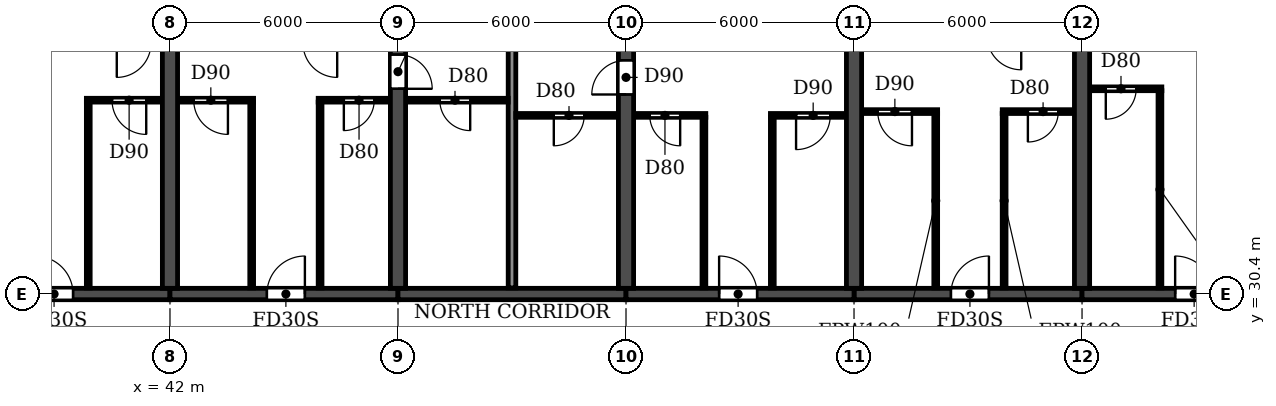
"""IFC4 building model, lengths in metres.
Left out: names, types, materials, properties, quantities, classifications, styles, units other than length and angle.
Written with IfcOpenShell. Run it as: python <this file> out.ifc"""

import sys

from ifc_helpers import new_model, si_unit, direction, frame, frame_2d, origin, place, context, subcontext, project, spatial, rectangle, extrude, element, fill, save


model = new_model("IFC4")
c1 = context("Model", 3, precision=1e-05, world=origin(), true_north=direction((0.0, 1.0)))
c2 = subcontext(c1, "Body", "Model", "MODEL_VIEW")
j1 = project(units=[si_unit("LENGTHUNIT", "METRE"), si_unit("PLANEANGLEUNIT", "RADIAN")], contexts=[c1])
p1 = place(None, origin())
s1 = spatial("IfcSite", under=j1, at=p1, CompositionType="ELEMENT")
p2 = place(p1, origin())
s2 = spatial("IfcBuilding", under=s1, at=p2, CompositionType="ELEMENT")
p3 = place(p2, frame((0.0, 0.0, 63.0)))
s3 = spatial("IfcBuildingStorey", under=s2, at=p3, CompositionType="ELEMENT", Elevation=63.0)
p4 = place(p3, frame((42.0, 30.55, 0.0), z_axis=(0.0, 0.0, 1.0), x_axis=(0.0, 1.0, 0.0)))
e1 = element("IfcWall", 1, at=p4, inside=s3, PredefinedType="SHEAR", context=c2, shape_type="SweptSolid", body=[
    extrude(rectangle(XDim=14.05, YDim=0.4, at=frame_2d((7.025, 0.0))), origin(), (0.0, 0.0, 1.0), 2.95),
])
p5 = place(p3, frame((48.0, 30.55, 0.0), z_axis=(0.0, 0.0, 1.0), x_axis=(0.0, 1.0, 0.0)))
e2 = element("IfcWall", 2, at=p5, inside=s3, PredefinedType="SHEAR", context=c2, shape_type="SweptSolid", body=[
    extrude(rectangle(XDim=14.05, YDim=0.4, at=frame_2d((7.025, 0.0))), origin(), (0.0, 0.0, 1.0), 2.95),
])
p6 = place(p5, frame((5.25, 0.0, 0.0)))
e3 = element("IfcOpeningElement", 3, at=p6, cuts=e2, PredefinedType="OPENING", context=c2, shape_type="SweptSolid", body=[
    extrude(rectangle(XDim=0.9, YDim=2.1, at=frame_2d((0.45, 1.05))), frame((0.0, 0.21, 0.0), z_axis=(0.0, -1.0, 0.0), x_axis=(1.0, 0.0, 0.0)), (0.0, 0.0, 1.0), 0.42),
])
p7 = place(p3, frame((54.0, 30.55, 0.0), z_axis=(0.0, 0.0, 1.0), x_axis=(0.0, 1.0, 0.0)))
e4 = element("IfcWall", 4, at=p7, inside=s3, PredefinedType="SHEAR", context=c2, shape_type="SweptSolid", body=[
    extrude(rectangle(XDim=14.05, YDim=0.4, at=frame_2d((7.025, 0.0))), origin(), (0.0, 0.0, 1.0), 2.95),
])
p8 = place(p7, frame((5.1, 0.0, 0.0)))
e5 = element("IfcOpeningElement", 5, at=p8, cuts=e4, PredefinedType="OPENING", context=c2, shape_type="SweptSolid", body=[
    extrude(rectangle(XDim=0.9, YDim=2.1, at=frame_2d((0.45, 1.05))), frame((0.0, 0.21, 0.0), z_axis=(0.0, -1.0, 0.0), x_axis=(1.0, 0.0, 0.0)), (0.0, 0.0, 1.0), 0.42),
])
for number, where, z_axis, x_axis in (
    (6, (60.0, 30.55, 0.0), (0.0, 0.0, 1.0), (0.0, 1.0, 0.0)),
    (7, (66.0, 30.55, 0.0), (0.0, 0.0, 1.0), (0.0, 1.0, 0.0)),
):
    element("IfcWall", number, at=place(p3, frame(where, z_axis=z_axis, x_axis=x_axis)), inside=s3, PredefinedType="SHEAR", context=c2, shape_type="SweptSolid", body=[
        extrude(rectangle(XDim=14.05, YDim=0.4, at=frame_2d((7.025, 0.0))), origin(), (0.0, 0.0, 1.0), 2.95),
    ])
p9 = place(p3, frame((36.0, 30.4, 0.0), z_axis=(0.0, 0.0, 1.0), x_axis=(1.0, 0.0, 0.0)))
e8 = element("IfcWall", 8, at=p9, inside=s3, PredefinedType="SHEAR", context=c2, shape_type="SweptSolid", body=[
    extrude(rectangle(XDim=6.0, YDim=0.3, at=frame_2d((3.0, 0.0))), origin(), (0.0, 0.0, 1.0), 2.35),
])
p10 = place(p9, frame((2.45, 0.0, 0.0)))
e9 = element("IfcOpeningElement", 9, at=p10, cuts=e8, PredefinedType="OPENING", context=c2, shape_type="SweptSolid", body=[
    extrude(rectangle(XDim=1.0, YDim=2.1, at=frame_2d((0.5, 1.05))), frame((0.0, 0.16, 0.0), z_axis=(0.0, -1.0, 0.0), x_axis=(1.0, 0.0, 0.0)), (0.0, 0.0, 1.0), 0.32),
])
p11 = place(p3, frame((42.0, 30.4, 0.0), z_axis=(0.0, 0.0, 1.0), x_axis=(1.0, 0.0, 0.0)))
e10 = element("IfcWall", 10, at=p11, inside=s3, PredefinedType="SHEAR", context=c2, shape_type="SweptSolid", body=[
    extrude(rectangle(XDim=6.0, YDim=0.3, at=frame_2d((3.0, 0.0))), origin(), (0.0, 0.0, 1.0), 2.35),
])
p12 = place(p11, frame((2.55, 0.0, 0.0)))
e11 = element("IfcOpeningElement", 11, at=p12, cuts=e10, PredefinedType="OPENING", context=c2, shape_type="SweptSolid", body=[
    extrude(rectangle(XDim=1.0, YDim=2.1, at=frame_2d((0.5, 1.05))), frame((0.0, 0.16, 0.0), z_axis=(0.0, -1.0, 0.0), x_axis=(1.0, 0.0, 0.0)), (0.0, 0.0, 1.0), 0.32),
])
p13 = place(p3, frame((48.0, 30.4, 0.0), z_axis=(0.0, 0.0, 1.0), x_axis=(1.0, 0.0, 0.0)))
e12 = element("IfcWall", 12, at=p13, inside=s3, PredefinedType="SHEAR", context=c2, shape_type="SweptSolid", body=[
    extrude(rectangle(XDim=6.0, YDim=0.3, at=frame_2d((3.0, 0.0))), origin(), (0.0, 0.0, 1.0), 2.35),
])
p14 = place(p3, frame((54.0, 30.4, 0.0), z_axis=(0.0, 0.0, 1.0), x_axis=(1.0, 0.0, 0.0)))
e13 = element("IfcWall", 13, at=p14, inside=s3, PredefinedType="SHEAR", context=c2, shape_type="SweptSolid", body=[
    extrude(rectangle(XDim=6.0, YDim=0.3, at=frame_2d((3.0, 0.0))), origin(), (0.0, 0.0, 1.0), 2.35),
])
p15 = place(p14, frame((2.45, 0.0, 0.0)))
e14 = element("IfcOpeningElement", 14, at=p15, cuts=e13, PredefinedType="OPENING", context=c2, shape_type="SweptSolid", body=[
    extrude(rectangle(XDim=1.0, YDim=2.1, at=frame_2d((0.5, 1.05))), frame((0.0, 0.16, 0.0), z_axis=(0.0, -1.0, 0.0), x_axis=(1.0, 0.0, 0.0)), (0.0, 0.0, 1.0), 0.32),
])
p16 = place(p3, frame((60.0, 30.4, 0.0), z_axis=(0.0, 0.0, 1.0), x_axis=(1.0, 0.0, 0.0)))
e15 = element("IfcWall", 15, at=p16, inside=s3, PredefinedType="SHEAR", context=c2, shape_type="SweptSolid", body=[
    extrude(rectangle(XDim=6.0, YDim=0.3, at=frame_2d((3.0, 0.0))), origin(), (0.0, 0.0, 1.0), 2.35),
])
p17 = place(p16, frame((2.55, 0.0, 0.0)))
e16 = element("IfcOpeningElement", 16, at=p17, cuts=e15, PredefinedType="OPENING", context=c2, shape_type="SweptSolid", body=[
    extrude(rectangle(XDim=1.0, YDim=2.1, at=frame_2d((0.5, 1.05))), frame((0.0, 0.16, 0.0), z_axis=(0.0, -1.0, 0.0), x_axis=(1.0, 0.0, 0.0)), (0.0, 0.0, 1.0), 0.32),
])
p18 = place(p3, frame((66.0, 30.4, 0.0), z_axis=(0.0, 0.0, 1.0), x_axis=(1.0, 0.0, 0.0)))
e17 = element("IfcWall", 17, at=p18, inside=s3, PredefinedType="SHEAR", context=c2, shape_type="SweptSolid", body=[
    extrude(rectangle(XDim=6.0, YDim=0.3, at=frame_2d((3.0, 0.0))), origin(), (0.0, 0.0, 1.0), 2.35),
])
p19 = place(p18, frame((2.45, 0.0, 0.0)))
e18 = element("IfcOpeningElement", 18, at=p19, cuts=e17, PredefinedType="OPENING", context=c2, shape_type="SweptSolid", body=[
    extrude(rectangle(XDim=1.0, YDim=2.1, at=frame_2d((0.5, 1.05))), frame((0.0, 0.16, 0.0), z_axis=(0.0, -1.0, 0.0), x_axis=(1.0, 0.0, 0.0)), (0.0, 0.0, 1.0), 0.32),
])
p20 = place(p3, frame((51.0, 30.56, 0.0), z_axis=(0.0, 0.0, 1.0), x_axis=(0.0, 1.0, 0.0)))
e19 = element("IfcWall", 19, at=p20, inside=s3, PredefinedType="PARTITIONING", context=c2, shape_type="SweptSolid", body=[
    extrude(rectangle(XDim=14.18, YDim=0.2, at=frame_2d((7.09, 0.0))), origin(), (0.0, 0.0, 1.0), 2.95),
])
p21 = place(p3, frame((51.1, 35.1, 0.0), z_axis=(0.0, 0.0, 1.0), x_axis=(1.0, 0.0, 0.0)))
e20 = element("IfcWall", 20, at=p21, inside=s3, PredefinedType="PARTITIONING", context=c2, shape_type="SweptSolid", body=[
    extrude(rectangle(XDim=2.69, YDim=0.1, at=frame_2d((1.345, 0.0))), origin(), (0.0, 0.0, 1.0), 2.95),
])
p22 = place(p21, frame((1.0, 0.0, 0.0)))
e21 = element("IfcOpeningElement", 21, at=p22, cuts=e20, PredefinedType="OPENING", context=c2, shape_type="SweptSolid", body=[
    extrude(rectangle(XDim=0.8, YDim=2.1, at=frame_2d((0.4, 1.05))), frame((0.0, 0.06, 0.0), z_axis=(0.0, -1.0, 0.0), x_axis=(1.0, 0.0, 0.0)), (0.0, 0.0, 1.0), 0.12),
])
p23 = place(p3, frame((54.21, 35.1, 0.0), z_axis=(0.0, 0.0, 1.0), x_axis=(1.0, 0.0, 0.0)))
e22 = element("IfcWall", 22, at=p23, inside=s3, PredefinedType="PARTITIONING", context=c2, shape_type="SweptSolid", body=[
    extrude(rectangle(XDim=1.89, YDim=0.1, at=frame_2d((0.945, 0.0))), origin(), (0.0, 0.0, 1.0), 2.95),
])
p24 = place(p23, frame((0.415, 0.0, 0.0)))
e23 = element("IfcOpeningElement", 23, at=p24, cuts=e22, PredefinedType="OPENING", context=c2, shape_type="SweptSolid", body=[
    extrude(rectangle(XDim=0.8, YDim=2.1, at=frame_2d((0.4, 1.05))), frame((0.0, 0.06, 0.0), z_axis=(0.0, -1.0, 0.0), x_axis=(1.0, 0.0, 0.0)), (0.0, 0.0, 1.0), 0.12),
])
p25 = place(p3, frame((57.8, 35.1, 0.0), z_axis=(0.0, 0.0, 1.0), x_axis=(1.0, 0.0, 0.0)))
e24 = element("IfcWall", 24, at=p25, inside=s3, PredefinedType="PARTITIONING", context=c2, shape_type="SweptSolid", body=[
    extrude(rectangle(XDim=1.99, YDim=0.1, at=frame_2d((0.995, 0.0))), origin(), (0.0, 0.0, 1.0), 2.95),
])
p26 = place(p25, frame((0.675, 0.0, 0.0)))
e25 = element("IfcOpeningElement", 25, at=p26, cuts=e24, PredefinedType="OPENING", context=c2, shape_type="SweptSolid", body=[
    extrude(rectangle(XDim=0.9, YDim=2.1, at=frame_2d((0.45, 1.05))), frame((0.0, 0.06, 0.0), z_axis=(0.0, -1.0, 0.0), x_axis=(1.0, 0.0, 0.0)), (0.0, 0.0, 1.0), 0.12),
])
p27 = place(p3, frame((60.21, 35.2, 0.0), z_axis=(0.0, 0.0, 1.0), x_axis=(1.0, 0.0, 0.0)))
e26 = element("IfcWall", 26, at=p27, inside=s3, PredefinedType="PARTITIONING", context=c2, shape_type="SweptSolid", body=[
    extrude(rectangle(XDim=1.99, YDim=0.1, at=frame_2d((0.995, 0.0))), origin(), (0.0, 0.0, 1.0), 2.95),
])
p28 = place(p27, frame((0.415, 0.0, 0.0)))
e27 = element("IfcOpeningElement", 27, at=p28, cuts=e26, PredefinedType="OPENING", context=c2, shape_type="SweptSolid", body=[
    extrude(rectangle(XDim=0.9, YDim=2.1, at=frame_2d((0.45, 1.05))), frame((0.0, 0.06, 0.0), z_axis=(0.0, -1.0, 0.0), x_axis=(1.0, 0.0, 0.0)), (0.0, 0.0, 1.0), 0.12),
])
p29 = place(p3, frame((63.9, 35.2, 0.0), z_axis=(0.0, 0.0, 1.0), x_axis=(1.0, 0.0, 0.0)))
e28 = element("IfcWall", 28, at=p29, inside=s3, PredefinedType="PARTITIONING", context=c2, shape_type="SweptSolid", body=[
    extrude(rectangle(XDim=1.89, YDim=0.1, at=frame_2d((0.945, 0.0))), origin(), (0.0, 0.0, 1.0), 2.95),
])
p30 = place(p29, frame((0.675, 0.0, 0.0)))
e29 = element("IfcOpeningElement", 29, at=p30, cuts=e28, PredefinedType="OPENING", context=c2, shape_type="SweptSolid", body=[
    extrude(rectangle(XDim=0.8, YDim=2.1, at=frame_2d((0.4, 1.05))), frame((0.0, 0.06, 0.0), z_axis=(0.0, -1.0, 0.0), x_axis=(1.0, 0.0, 0.0)), (0.0, 0.0, 1.0), 0.12),
])
p31 = place(p3, frame((39.8, 35.5, 0.0), z_axis=(0.0, 0.0, 1.0), x_axis=(1.0, 0.0, 0.0)))
e30 = element("IfcWall", 30, at=p31, inside=s3, PredefinedType="PARTITIONING", context=c2, shape_type="SweptSolid", body=[
    extrude(rectangle(XDim=1.99, YDim=0.1, at=frame_2d((0.995, 0.0))), origin(), (0.0, 0.0, 1.0), 2.95),
])
p32 = place(p31, frame((0.675, 0.0, 0.0)))
e31 = element("IfcOpeningElement", 31, at=p32, cuts=e30, PredefinedType="OPENING", context=c2, shape_type="SweptSolid", body=[
    extrude(rectangle(XDim=0.9, YDim=2.1, at=frame_2d((0.45, 1.05))), frame((0.0, 0.06, 0.0), z_axis=(0.0, -1.0, 0.0), x_axis=(1.0, 0.0, 0.0)), (0.0, 0.0, 1.0), 0.12),
])
p33 = place(p3, frame((42.21, 35.5, 0.0), z_axis=(0.0, 0.0, 1.0), x_axis=(1.0, 0.0, 0.0)))
e32 = element("IfcWall", 32, at=p33, inside=s3, PredefinedType="PARTITIONING", context=c2, shape_type="SweptSolid", body=[
    extrude(rectangle(XDim=1.99, YDim=0.1, at=frame_2d((0.995, 0.0))), origin(), (0.0, 0.0, 1.0), 2.95),
])
p34 = place(p33, frame((0.415, 0.0, 0.0)))
e33 = element("IfcOpeningElement", 33, at=p34, cuts=e32, PredefinedType="OPENING", context=c2, shape_type="SweptSolid", body=[
    extrude(rectangle(XDim=0.9, YDim=2.1, at=frame_2d((0.45, 1.05))), frame((0.0, 0.06, 0.0), z_axis=(0.0, -1.0, 0.0), x_axis=(1.0, 0.0, 0.0)), (0.0, 0.0, 1.0), 0.12),
])
p35 = place(p3, frame((45.9, 35.5, 0.0), z_axis=(0.0, 0.0, 1.0), x_axis=(1.0, 0.0, 0.0)))
e34 = element("IfcWall", 34, at=p35, inside=s3, PredefinedType="PARTITIONING", context=c2, shape_type="SweptSolid", body=[
    extrude(rectangle(XDim=1.89, YDim=0.1, at=frame_2d((0.945, 0.0))), origin(), (0.0, 0.0, 1.0), 2.95),
])
p36 = place(p35, frame((0.675, 0.0, 0.0)))
e35 = element("IfcOpeningElement", 35, at=p36, cuts=e34, PredefinedType="OPENING", context=c2, shape_type="SweptSolid", body=[
    extrude(rectangle(XDim=0.8, YDim=2.1, at=frame_2d((0.4, 1.05))), frame((0.0, 0.06, 0.0), z_axis=(0.0, -1.0, 0.0), x_axis=(1.0, 0.0, 0.0)), (0.0, 0.0, 1.0), 0.12),
])
p37 = place(p3, frame((48.21, 35.5, 0.0), z_axis=(0.0, 0.0, 1.0), x_axis=(1.0, 0.0, 0.0)))
e36 = element("IfcWall", 36, at=p37, inside=s3, PredefinedType="PARTITIONING", context=c2, shape_type="SweptSolid", body=[
    extrude(rectangle(XDim=2.69, YDim=0.1, at=frame_2d((1.345, 0.0))), origin(), (0.0, 0.0, 1.0), 2.95),
])
p38 = place(p37, frame((0.89, 0.0, 0.0)))
e37 = element("IfcOpeningElement", 37, at=p38, cuts=e36, PredefinedType="OPENING", context=c2, shape_type="SweptSolid", body=[
    extrude(rectangle(XDim=0.8, YDim=2.1, at=frame_2d((0.4, 1.05))), frame((0.0, 0.06, 0.0), z_axis=(0.0, -1.0, 0.0), x_axis=(1.0, 0.0, 0.0)), (0.0, 0.0, 1.0), 0.12),
])
p39 = place(p3, frame((66.21, 35.8, 0.0), z_axis=(0.0, 0.0, 1.0), x_axis=(1.0, 0.0, 0.0)))
e38 = element("IfcWall", 38, at=p39, inside=s3, PredefinedType="PARTITIONING", context=c2, shape_type="SweptSolid", body=[
    extrude(rectangle(XDim=1.89, YDim=0.1, at=frame_2d((0.945, 0.0))), origin(), (0.0, 0.0, 1.0), 2.95),
])
p40 = place(p39, frame((0.415, 0.0, 0.0)))
e39 = element("IfcOpeningElement", 39, at=p40, cuts=e38, PredefinedType="OPENING", context=c2, shape_type="SweptSolid", body=[
    extrude(rectangle(XDim=0.8, YDim=2.1, at=frame_2d((0.4, 1.05))), frame((0.0, 0.06, 0.0), z_axis=(0.0, -1.0, 0.0), x_axis=(1.0, 0.0, 0.0)), (0.0, 0.0, 1.0), 0.12),
])
for number, where, z_axis, x_axis in (
    (40, (39.85, 30.56, 0.0), (0.0, 0.0, 1.0), (0.0, 1.0, 0.0)),
    (41, (44.15, 30.56, 0.0), (0.0, 0.0, 1.0), (0.0, 1.0, 0.0)),
    (42, (45.95, 30.56, 0.0), (0.0, 0.0, 1.0), (0.0, 1.0, 0.0)),
):
    element("IfcWall", number, at=place(p3, frame(where, z_axis=z_axis, x_axis=x_axis)), inside=s3, PredefinedType="PARTITIONING", context=c2, shape_type="SweptSolid", body=[
        extrude(rectangle(XDim=4.89, YDim=0.1, at=frame_2d((2.445, 0.0))), origin(), (0.0, 0.0, 1.0), 2.95),
    ])
for number, where, z_axis, x_axis in (
    (43, (56.05, 30.56, 0.0), (0.0, 0.0, 1.0), (0.0, 1.0, 0.0)),
    (44, (57.85, 30.56, 0.0), (0.0, 0.0, 1.0), (0.0, 1.0, 0.0)),
):
    element("IfcWall", number, at=place(p3, frame(where, z_axis=z_axis, x_axis=x_axis)), inside=s3, PredefinedType="PARTITIONING", context=c2, shape_type="SweptSolid", body=[
        extrude(rectangle(XDim=4.49, YDim=0.1, at=frame_2d((2.245, 0.0))), origin(), (0.0, 0.0, 1.0), 2.95),
    ])
for number, where, z_axis, x_axis in (
    (45, (62.15, 30.56, 0.0), (0.0, 0.0, 1.0), (0.0, 1.0, 0.0)),
    (46, (63.95, 30.56, 0.0), (0.0, 0.0, 1.0), (0.0, 1.0, 0.0)),
):
    element("IfcWall", number, at=place(p3, frame(where, z_axis=z_axis, x_axis=x_axis)), inside=s3, PredefinedType="PARTITIONING", context=c2, shape_type="SweptSolid", body=[
        extrude(rectangle(XDim=4.59, YDim=0.1, at=frame_2d((2.295, 0.0))), origin(), (0.0, 0.0, 1.0), 2.95),
    ])
p41 = place(p3, frame((68.05, 30.56, 0.0), z_axis=(0.0, 0.0, 1.0), x_axis=(0.0, 1.0, 0.0)))
e47 = element("IfcWall", 47, at=p41, inside=s3, PredefinedType="PARTITIONING", context=c2, shape_type="SweptSolid", body=[
    extrude(rectangle(XDim=5.19, YDim=0.1, at=frame_2d((2.595, 0.0))), origin(), (0.0, 0.0, 1.0), 2.95),
])
p42 = place(p10, origin())
e48 = element("IfcDoor", 48, at=p42, inside=s3, OperationType="SINGLE_SWING_LEFT", PredefinedType="DOOR", context=c2, shape_type="SweptSolid", body=[
    extrude(rectangle(XDim=1.0, YDim=2.1, at=frame_2d((0.5, 1.05))), frame((0.0, 0.025, 0.0), z_axis=(0.0, -1.0, 0.0), x_axis=(1.0, 0.0, 0.0)), (0.0, 0.0, 1.0), 0.05),
])
fill(e9, e48)
p43 = place(p32, frame((0.9, 0.0, 0.0), z_axis=(0.0, 0.0, 1.0), x_axis=(-1.0, 0.0, 0.0)))
e49 = element("IfcDoor", 49, at=p43, inside=s3, OperationType="SINGLE_SWING_LEFT", PredefinedType="DOOR", context=c2, shape_type="SweptSolid", body=[
    extrude(rectangle(XDim=0.9, YDim=2.1, at=frame_2d((0.45, 1.05))), frame((0.0, 0.025, 0.0), z_axis=(0.0, -1.0, 0.0), x_axis=(1.0, 0.0, 0.0)), (0.0, 0.0, 1.0), 0.05),
])
fill(e31, e49)
p44 = place(p38, frame((0.8, 0.0, 0.0), z_axis=(0.0, 0.0, 1.0), x_axis=(-1.0, 0.0, 0.0)))
e50 = element("IfcDoor", 50, at=p44, inside=s3, OperationType="SINGLE_SWING_LEFT", PredefinedType="DOOR", context=c2, shape_type="SweptSolid", body=[
    extrude(rectangle(XDim=0.8, YDim=2.1, at=frame_2d((0.4, 1.05))), frame((0.0, 0.025, 0.0), z_axis=(0.0, -1.0, 0.0), x_axis=(1.0, 0.0, 0.0)), (0.0, 0.0, 1.0), 0.05),
])
fill(e37, e50)
p45 = place(p34, frame((0.9, 0.0, 0.0), z_axis=(0.0, 0.0, 1.0), x_axis=(-1.0, 0.0, 0.0)))
e51 = element("IfcDoor", 51, at=p45, inside=s3, OperationType="SINGLE_SWING_LEFT", PredefinedType="DOOR", context=c2, shape_type="SweptSolid", body=[
    extrude(rectangle(XDim=0.9, YDim=2.1, at=frame_2d((0.45, 1.05))), frame((0.0, 0.025, 0.0), z_axis=(0.0, -1.0, 0.0), x_axis=(1.0, 0.0, 0.0)), (0.0, 0.0, 1.0), 0.05),
])
fill(e33, e51)
p46 = place(p12, origin())
e52 = element("IfcDoor", 52, at=p46, inside=s3, OperationType="SINGLE_SWING_RIGHT", PredefinedType="DOOR", context=c2, shape_type="SweptSolid", body=[
    extrude(rectangle(XDim=1.0, YDim=2.1, at=frame_2d((0.5, 1.05))), frame((0.0, 0.025, 0.0), z_axis=(0.0, -1.0, 0.0), x_axis=(1.0, 0.0, 0.0)), (0.0, 0.0, 1.0), 0.05),
])
fill(e11, e52)
p47 = place(p36, frame((0.8, 0.0, 0.0), z_axis=(0.0, 0.0, 1.0), x_axis=(-1.0, 0.0, 0.0)))
e53 = element("IfcDoor", 53, at=p47, inside=s3, OperationType="SINGLE_SWING_RIGHT", PredefinedType="DOOR", context=c2, shape_type="SweptSolid", body=[
    extrude(rectangle(XDim=0.8, YDim=2.1, at=frame_2d((0.4, 1.05))), frame((0.0, 0.025, 0.0), z_axis=(0.0, -1.0, 0.0), x_axis=(1.0, 0.0, 0.0)), (0.0, 0.0, 1.0), 0.05),
])
fill(e35, e53)
p48 = place(p6, frame((0.9, 0.0, 0.0), z_axis=(0.0, 0.0, 1.0), x_axis=(-1.0, 0.0, 0.0)))
e54 = element("IfcDoor", 54, at=p48, inside=s3, OperationType="SINGLE_SWING_RIGHT", PredefinedType="DOOR", context=c2, shape_type="SweptSolid", body=[
    extrude(rectangle(XDim=0.9, YDim=2.1, at=frame_2d((0.45, 1.05))), frame((0.0, 0.025, 0.0), z_axis=(0.0, -1.0, 0.0), x_axis=(1.0, 0.0, 0.0)), (0.0, 0.0, 1.0), 0.05),
])
fill(e3, e54)
p49 = place(p22, frame((0.8, 0.0, 0.0), z_axis=(0.0, 0.0, 1.0), x_axis=(-1.0, 0.0, 0.0)))
e55 = element("IfcDoor", 55, at=p49, inside=s3, OperationType="SINGLE_SWING_RIGHT", PredefinedType="DOOR", context=c2, shape_type="SweptSolid", body=[
    extrude(rectangle(XDim=0.8, YDim=2.1, at=frame_2d((0.4, 1.05))), frame((0.0, 0.025, 0.0), z_axis=(0.0, -1.0, 0.0), x_axis=(1.0, 0.0, 0.0)), (0.0, 0.0, 1.0), 0.05),
])
fill(e21, e55)
p50 = place(p8, origin())
e56 = element("IfcDoor", 56, at=p50, inside=s3, OperationType="SINGLE_SWING_LEFT", PredefinedType="DOOR", context=c2, shape_type="SweptSolid", body=[
    extrude(rectangle(XDim=0.9, YDim=2.1, at=frame_2d((0.45, 1.05))), frame((0.0, 0.025, 0.0), z_axis=(0.0, -1.0, 0.0), x_axis=(1.0, 0.0, 0.0)), (0.0, 0.0, 1.0), 0.05),
])
fill(e5, e56)
p51 = place(p24, frame((0.8, 0.0, 0.0), z_axis=(0.0, 0.0, 1.0), x_axis=(-1.0, 0.0, 0.0)))
e57 = element("IfcDoor", 57, at=p51, inside=s3, OperationType="SINGLE_SWING_LEFT", PredefinedType="DOOR", context=c2, shape_type="SweptSolid", body=[
    extrude(rectangle(XDim=0.8, YDim=2.1, at=frame_2d((0.4, 1.05))), frame((0.0, 0.025, 0.0), z_axis=(0.0, -1.0, 0.0), x_axis=(1.0, 0.0, 0.0)), (0.0, 0.0, 1.0), 0.05),
])
fill(e23, e57)
p52 = place(p15, origin())
e58 = element("IfcDoor", 58, at=p52, inside=s3, OperationType="SINGLE_SWING_LEFT", PredefinedType="DOOR", context=c2, shape_type="SweptSolid", body=[
    extrude(rectangle(XDim=1.0, YDim=2.1, at=frame_2d((0.5, 1.05))), frame((0.0, 0.025, 0.0), z_axis=(0.0, -1.0, 0.0), x_axis=(1.0, 0.0, 0.0)), (0.0, 0.0, 1.0), 0.05),
])
fill(e14, e58)
p53 = place(p26, frame((0.9, 0.0, 0.0), z_axis=(0.0, 0.0, 1.0), x_axis=(-1.0, 0.0, 0.0)))
e59 = element("IfcDoor", 59, at=p53, inside=s3, OperationType="SINGLE_SWING_RIGHT", PredefinedType="DOOR", context=c2, shape_type="SweptSolid", body=[
    extrude(rectangle(XDim=0.9, YDim=2.1, at=frame_2d((0.45, 1.05))), frame((0.0, 0.025, 0.0), z_axis=(0.0, -1.0, 0.0), x_axis=(1.0, 0.0, 0.0)), (0.0, 0.0, 1.0), 0.05),
])
fill(e25, e59)
p54 = place(p28, frame((0.9, 0.0, 0.0), z_axis=(0.0, 0.0, 1.0), x_axis=(-1.0, 0.0, 0.0)))
e60 = element("IfcDoor", 60, at=p54, inside=s3, OperationType="SINGLE_SWING_LEFT", PredefinedType="DOOR", context=c2, shape_type="SweptSolid", body=[
    extrude(rectangle(XDim=0.9, YDim=2.1, at=frame_2d((0.45, 1.05))), frame((0.0, 0.025, 0.0), z_axis=(0.0, -1.0, 0.0), x_axis=(1.0, 0.0, 0.0)), (0.0, 0.0, 1.0), 0.05),
])
fill(e27, e60)
p55 = place(p17, origin())
e61 = element("IfcDoor", 61, at=p55, inside=s3, OperationType="SINGLE_SWING_RIGHT", PredefinedType="DOOR", context=c2, shape_type="SweptSolid", body=[
    extrude(rectangle(XDim=1.0, YDim=2.1, at=frame_2d((0.5, 1.05))), frame((0.0, 0.025, 0.0), z_axis=(0.0, -1.0, 0.0), x_axis=(1.0, 0.0, 0.0)), (0.0, 0.0, 1.0), 0.05),
])
fill(e16, e61)
p56 = place(p30, frame((0.8, 0.0, 0.0), z_axis=(0.0, 0.0, 1.0), x_axis=(-1.0, 0.0, 0.0)))
e62 = element("IfcDoor", 62, at=p56, inside=s3, OperationType="SINGLE_SWING_RIGHT", PredefinedType="DOOR", context=c2, shape_type="SweptSolid", body=[
    extrude(rectangle(XDim=0.8, YDim=2.1, at=frame_2d((0.4, 1.05))), frame((0.0, 0.025, 0.0), z_axis=(0.0, -1.0, 0.0), x_axis=(1.0, 0.0, 0.0)), (0.0, 0.0, 1.0), 0.05),
])
fill(e29, e62)
p57 = place(p40, frame((0.8, 0.0, 0.0), z_axis=(0.0, 0.0, 1.0), x_axis=(-1.0, 0.0, 0.0)))
e63 = element("IfcDoor", 63, at=p57, inside=s3, OperationType="SINGLE_SWING_RIGHT", PredefinedType="DOOR", context=c2, shape_type="SweptSolid", body=[
    extrude(rectangle(XDim=0.8, YDim=2.1, at=frame_2d((0.4, 1.05))), frame((0.0, 0.025, 0.0), z_axis=(0.0, -1.0, 0.0), x_axis=(1.0, 0.0, 0.0)), (0.0, 0.0, 1.0), 0.05),
])
fill(e39, e63)
p58 = place(p19, origin())
e64 = element("IfcDoor", 64, at=p58, inside=s3, OperationType="SINGLE_SWING_LEFT", PredefinedType="DOOR", context=c2, shape_type="SweptSolid", body=[
    extrude(rectangle(XDim=1.0, YDim=2.1, at=frame_2d((0.5, 1.05))), frame((0.0, 0.025, 0.0), z_axis=(0.0, -1.0, 0.0), x_axis=(1.0, 0.0, 0.0)), (0.0, 0.0, 1.0), 0.05),
])
fill(e18, e64)
save(model, sys.argv[1])
